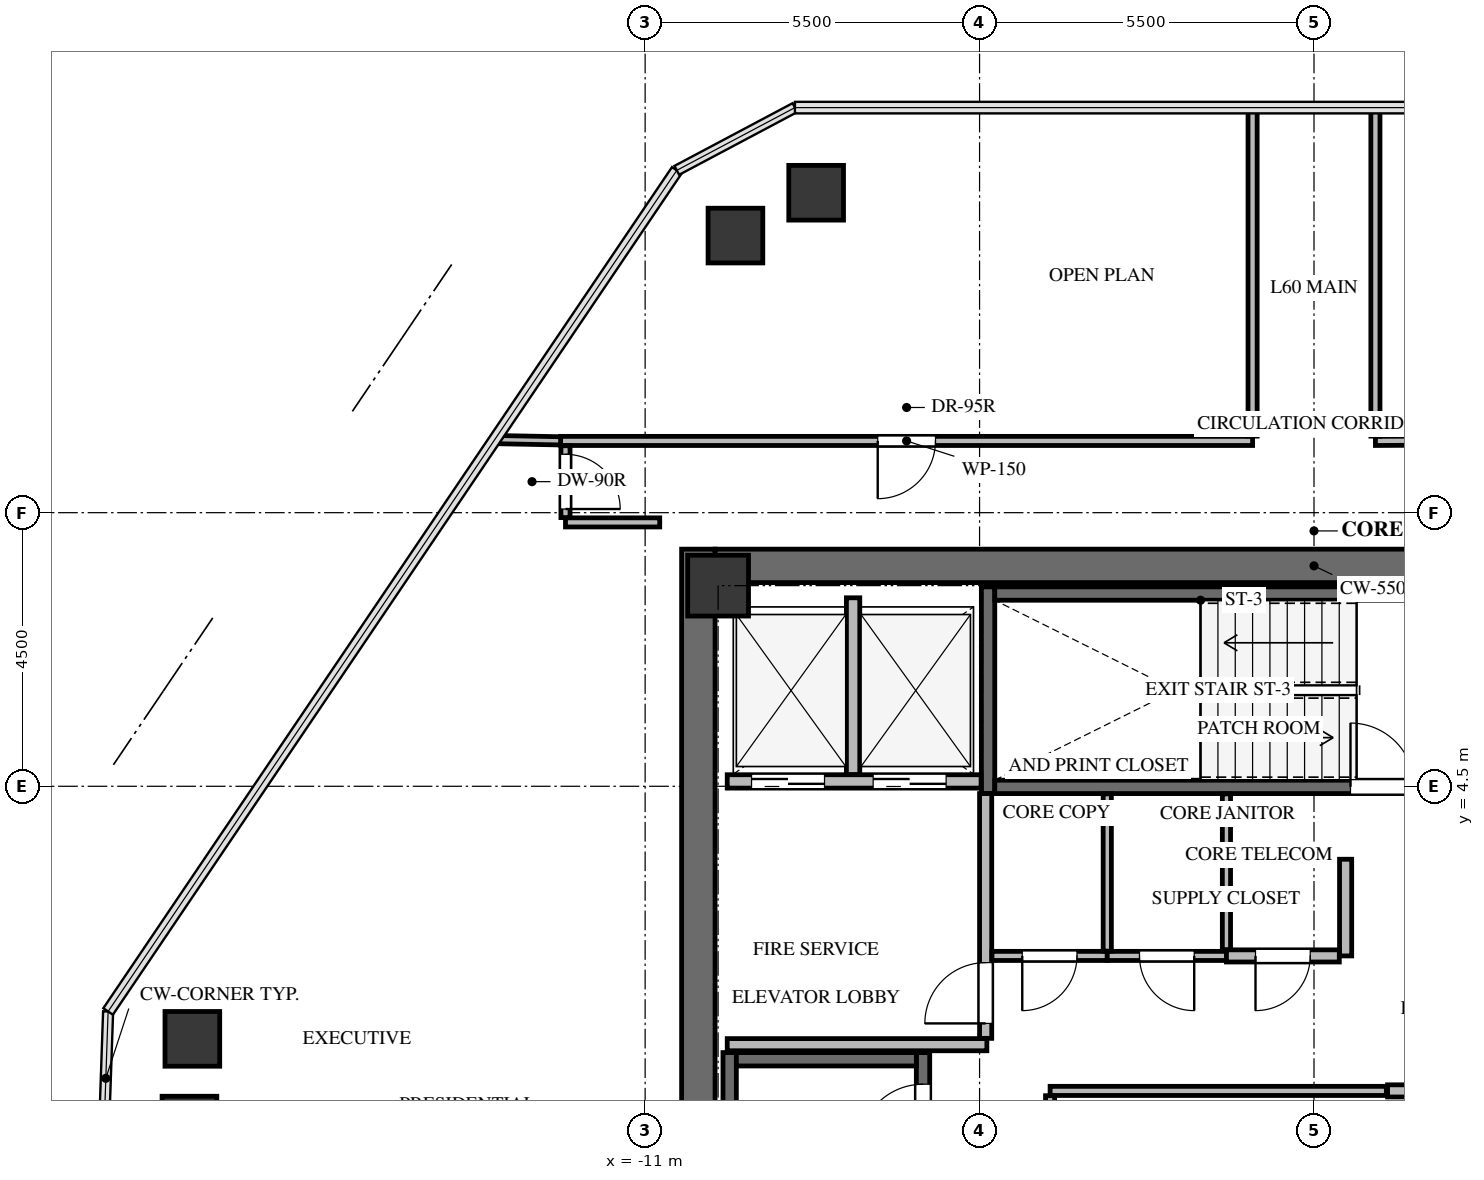
"""IFC4 building model, lengths in metres.
Left out: names, types, materials, properties, quantities, classifications, styles, units other than length and angle.
Written with IfcOpenShell. Run it as: python <this file> out.ifc"""

import sys

from ifc_helpers import new_model, si_unit, direction, frame, frame_2d, origin, origin_2d, place, context, subcontext, project, spatial, rectangle, extrude, source, transform, mapped, element, fill, save


model = new_model("IFC4")
c1 = context("Model", 3, precision=1e-05, world=origin(), true_north=direction((0.0, 1.0)))
c2 = subcontext(c1, "Body", "Model", "MODEL_VIEW")
j1 = project(units=[si_unit("LENGTHUNIT", "METRE"), si_unit("PLANEANGLEUNIT", "RADIAN")], contexts=[c1])
p1 = place(None, origin())
s1 = spatial("IfcSite", under=j1, at=p1, CompositionType="ELEMENT")
p2 = place(p1, origin())
s2 = spatial("IfcBuilding", under=s1, at=p2, CompositionType="ELEMENT")
p3 = place(p2, frame((0.0, 0.0, 218.3)))
s3 = spatial("IfcBuildingStorey", under=s2, at=p3, CompositionType="ELEMENT", Elevation=218.3)
p4 = place(p3, frame((-10.125, -8.4, 0.0), z_axis=(0.0, 0.0, 1.0), x_axis=(0.0, 1.0, 0.0)))
e1 = element("IfcWall", 1, at=p4, inside=s3, PredefinedType="SHEAR", context=c2, shape_type="SweptSolid", body=[
    extrude(rectangle(XDim=16.8, YDim=0.55, at=frame_2d((8.4, 0.0))), origin(), (0.0, 0.0, 1.0), 3.3),
])
p5 = place(p3, frame((-9.85, 8.125, 0.0), z_axis=(0.0, 0.0, 1.0), x_axis=(1.0, 0.0, 0.0)))
e2 = element("IfcWall", 2, at=p5, inside=s3, PredefinedType="SHEAR", context=c2, shape_type="SweptSolid", body=[
    extrude(rectangle(XDim=19.7, YDim=0.55, at=frame_2d((9.85, 0.0))), origin(), (0.0, 0.0, 1.0), 3.3),
])
p6 = place(p3, frame((-6.43, -7.77, -0.24), z_axis=(0.0, 0.0, 1.0), x_axis=(0.0, 1.0, 0.0)))
e3 = element("IfcWall", 3, at=p6, inside=s3, PredefinedType="SHEAR", context=c2, shape_type="SweptSolid", body=[
    extrude(rectangle(XDim=7.89, YDim=0.22, at=frame_2d((3.945, 0.0))), origin(), (0.0, 0.0, 1.0), 3.3),
])
p7 = place(p6, frame((6.32, 0.0, 0.0)))
e4 = element("IfcOpeningElement", 4, at=p7, cuts=e3, PredefinedType="OPENING", context=c2, shape_type="SweptSolid", body=[
    extrude(rectangle(XDim=1.05, YDim=2.15, at=frame_2d((0.525, 1.075))), frame((0.0, 0.12, 0.0), z_axis=(0.0, -1.0, 0.0), x_axis=(1.0, 0.0, 0.0)), (0.0, 0.0, 1.0), 0.24),
])
p8 = place(p3, frame((-9.61, 0.12, -0.24), z_axis=(0.0, 0.0, 1.0), x_axis=(0.0, -1.0, 0.0)))
e5 = element("IfcWall", 5, at=p8, inside=s3, PredefinedType="SHEAR", context=c2, shape_type="SweptSolid", body=[
    extrude(rectangle(XDim=7.89, YDim=0.22, at=frame_2d((3.945, 0.0))), origin(), (0.0, 0.0, 1.0), 3.3),
])
p9 = place(p3, frame((-6.54, 0.01, -0.24), z_axis=(0.0, 0.0, 1.0), x_axis=(-1.0, 0.0, 0.0)))
e6 = element("IfcWall", 6, at=p9, inside=s3, PredefinedType="SHEAR", context=c2, shape_type="SweptSolid", body=[
    extrude(rectangle(XDim=2.96, YDim=0.22, at=frame_2d((1.48, 0.0))), origin(), (0.0, 0.0, 1.0), 3.3),
])
p10 = place(p3, frame((-5.36, 7.78, -0.24), z_axis=(0.0, 0.0, 1.0), x_axis=(0.0, -1.0, 0.0)))
e7 = element("IfcWall", 7, at=p10, inside=s3, PredefinedType="SHEAR", context=c2, shape_type="SweptSolid", body=[
    extrude(rectangle(XDim=3.4, YDim=0.22, at=frame_2d((1.7, 0.0))), origin(), (0.0, 0.0, 1.0), 3.3),
])
p11 = place(p3, frame((-5.25, 4.49, -0.24), z_axis=(0.0, 0.0, 1.0), x_axis=(1.0, 0.0, 0.0)))
e8 = element("IfcWall", 8, at=p11, inside=s3, PredefinedType="SHEAR", context=c2, shape_type="SweptSolid", body=[
    extrude(rectangle(XDim=7.35, YDim=0.22, at=frame_2d((3.675, 0.0))), origin(), (0.0, 0.0, 1.0), 3.3),
])
p12 = place(p11, frame((5.85, 0.0, 0.0)))
e9 = element("IfcOpeningElement", 9, at=p12, cuts=e8, PredefinedType="OPENING", context=c2, shape_type="SweptSolid", body=[
    extrude(rectangle(XDim=1.05, YDim=2.15, at=frame_2d((0.525, 1.075))), frame((0.0, 0.12, 0.0), z_axis=(0.0, -1.0, 0.0), x_axis=(1.0, 0.0, 0.0)), (0.0, 0.0, 1.0), 0.24),
])
p13 = place(p3, frame((2.1, 7.67, -0.24), z_axis=(0.0, 0.0, 1.0), x_axis=(-1.0, 0.0, 0.0)))
e10 = element("IfcWall", 10, at=p13, inside=s3, PredefinedType="SHEAR", context=c2, shape_type="SweptSolid", body=[
    extrude(rectangle(XDim=7.35, YDim=0.22, at=frame_2d((3.675, 0.0))), origin(), (0.0, 0.0, 1.0), 3.3),
])
m1 = source(origin(), c2, "Body", "SweptSolid", [
    extrude(rectangle(XDim=1.0, YDim=1.0, at=origin_2d()), origin(), (0.0, 0.0, 1.0), 3.3),
])
p14 = place(p3, frame((-9.8, 7.8, -0.24), z_axis=(0.0, 0.0, 1.0), x_axis=(1.0, 0.0, 0.0)))
e11 = element("IfcColumn", 11, at=p14, inside=s3, PredefinedType="COLUMN", context=c2, shape_type="MappedRepresentation", body=[
    mapped(m1, transform((0.0, 0.0, 0.0), x_axis=(1.0, 0.0, 0.0), y_axis=(0.0, 1.0, 0.0), z_axis=(0.0, 0.0, 1.0), scale=1.0)),
])
m2 = source(origin(), c2, "Body", "SweptSolid", [
    extrude(rectangle(XDim=0.9, YDim=0.9, at=origin_2d()), origin(), (0.0, 0.0, 1.0), 3.3),
])
for number, where, z_axis, x_axis in (
    (12, (-18.494, -1.048, -0.24), (0.0, 0.0, 1.0), (1.0, 0.0, 0.0)),
    (13, (-18.446, 0.346, -0.24), (0.0, 0.0, 1.0), (1.0, 0.0, 0.0)),
    (14, (-9.515, 13.557, -0.24), (0.0, 0.0, 1.0), (1.0, 0.0, 0.0)),
    (15, (-8.188, 14.262, -0.24), (0.0, 0.0, 1.0), (1.0, 0.0, 0.0)),
):
    element("IfcColumn", number, at=place(p3, frame(where, z_axis=z_axis, x_axis=x_axis)), inside=s3, PredefinedType="COLUMN", context=c2, shape_type="MappedRepresentation", body=[
        mapped(m2, transform((0.0, 0.0, 0.0), x_axis=(1.0, 0.0, 0.0), y_axis=(0.0, 1.0, 0.0), z_axis=(0.0, 0.0, 1.0), scale=1.0)),
    ])
p15 = place(p3, frame((-9.65, 4.58, 0.0), z_axis=(0.0, 0.0, 1.0), x_axis=(1.0, 0.0, 0.0)))
e16 = element("IfcWall", 16, at=p15, inside=s3, PredefinedType="SOLIDWALL", context=c2, shape_type="SweptSolid", body=[
    extrude(rectangle(XDim=4.175, YDim=0.22, at=frame_2d((2.087, 0.0))), origin(), (0.0, 0.0, 1.0), 3.045),
])
p16 = place(p15, frame((0.4, 0.0, 0.0)))
e17 = element("IfcOpeningElement", 17, at=p16, cuts=e16, PredefinedType="OPENING", context=c2, shape_type="SweptSolid", body=[
    extrude(rectangle(XDim=1.2, YDim=2.15, at=frame_2d((0.6, 1.075))), frame((0.0, 0.12, 0.0), z_axis=(0.0, -1.0, 0.0), x_axis=(1.0, 0.0, 0.0)), (0.0, 0.0, 1.0), 0.24),
])
p17 = place(p15, frame((2.4, 0.0, 0.0)))
e18 = element("IfcOpeningElement", 18, at=p17, cuts=e16, PredefinedType="OPENING", context=c2, shape_type="SweptSolid", body=[
    extrude(rectangle(XDim=1.2, YDim=2.15, at=frame_2d((0.6, 1.075))), frame((0.0, 0.12, 0.0), z_axis=(0.0, -1.0, 0.0), x_axis=(1.0, 0.0, 0.0)), (0.0, 0.0, 1.0), 0.24),
])
p18 = place(p3, frame((-7.58, 4.694, 0.0), z_axis=(0.0, 0.0, 1.0), x_axis=(0.0, 1.0, 0.0)))
e19 = element("IfcWall", 19, at=p18, inside=s3, PredefinedType="SOLIDWALL", context=c2, shape_type="SweptSolid", body=[
    extrude(rectangle(XDim=2.906, YDim=0.22, at=frame_2d((1.453, 0.0))), origin(), (0.0, 0.0, 1.0), 3.045),
])
p19 = place(p3, frame((-9.65, 0.25, 0.0), z_axis=(0.0, 0.0, 1.0), x_axis=(1.0, 0.0, 0.0)))
e20 = element("IfcWall", 20, at=p19, inside=s3, PredefinedType="SOLIDWALL", context=c2, shape_type="SweptSolid", body=[
    extrude(rectangle(XDim=4.27, YDim=0.2, at=frame_2d((2.135, 0.0))), origin(), (0.0, 0.0, 1.0), 3.045),
])
p20 = place(p3, frame((-5.4, 0.354, 0.0), z_axis=(0.0, 0.0, 1.0), x_axis=(0.0, 1.0, 0.0)))
e21 = element("IfcWall", 21, at=p20, inside=s3, PredefinedType="SOLIDWALL", context=c2, shape_type="SweptSolid", body=[
    extrude(rectangle(XDim=4.026, YDim=0.2, at=frame_2d((2.013, 0.0))), origin(), (0.0, 0.0, 1.0), 3.045),
])
p21 = place(p20, frame((0.246, 0.0, 0.0)))
e22 = element("IfcOpeningElement", 22, at=p21, cuts=e21, PredefinedType="OPENING", context=c2, shape_type="SweptSolid", body=[
    extrude(rectangle(XDim=1.0, YDim=2.15, at=frame_2d((0.5, 1.075))), frame((0.0, 0.11, 0.0), z_axis=(0.0, -1.0, 0.0), x_axis=(1.0, 0.0, 0.0)), (0.0, 0.0, 1.0), 0.22),
])
p22 = place(p3, frame((-4.34, -0.51, 0.0), z_axis=(0.0, 0.0, 1.0), x_axis=(1.0, 0.0, 0.0)))
e23 = element("IfcWall", 23, at=p22, inside=s3, PredefinedType="PARTITIONING", context=c2, shape_type="SweptSolid", body=[
    extrude(rectangle(XDim=5.53, YDim=0.15, at=frame_2d((2.765, 0.0))), origin(), (0.0, 0.0, 1.0), 3.045),
])
p23 = place(p3, frame((-4.34, -2.961, 0.0), z_axis=(0.0, 0.0, 1.0), x_axis=(0.0, 1.0, 0.0)))
e24 = element("IfcWall", 24, at=p23, inside=s3, PredefinedType="PARTITIONING", context=c2, shape_type="SweptSolid", body=[
    extrude(rectangle(XDim=2.372, YDim=0.15, at=frame_2d((1.186, 0.0))), origin(), (0.0, 0.0, 1.0), 3.045),
])
p24 = place(p3, frame((1.21, -0.51, 0.0), z_axis=(0.0, 0.0, 1.0), x_axis=(1.0, 0.0, 0.0)))
e25 = element("IfcWall", 25, at=p24, inside=s3, PredefinedType="SOLIDWALL", context=c2, shape_type="SweptSolid", body=[
    extrude(rectangle(XDim=1.826, YDim=0.2, at=frame_2d((0.913, 0.0))), origin(), (0.0, 0.0, 1.0), 3.045),
])
p25 = place(p3, frame((-3.4, 1.71, 0.0), z_axis=(0.0, 0.0, 1.0), x_axis=(-1.0, 0.0, 0.0)))
e26 = element("IfcWall", 26, at=p25, inside=s3, PredefinedType="PARTITIONING", context=c2, shape_type="SweptSolid", body=[
    extrude(rectangle(XDim=1.896, YDim=0.15, at=frame_2d((0.948, 0.0))), origin(), (0.0, 0.0, 1.0), 3.045),
])
p26 = place(p25, frame((0.498, 0.0, 0.0)))
e27 = element("IfcOpeningElement", 27, at=p26, cuts=e26, PredefinedType="OPENING", context=c2, shape_type="SweptSolid", body=[
    extrude(rectangle(XDim=0.9, YDim=2.05, at=frame_2d((0.45, 1.025))), frame((0.0, 0.085, 0.0), z_axis=(0.0, -1.0, 0.0), x_axis=(1.0, 0.0, 0.0)), (0.0, 0.0, 1.0), 0.17),
])
p27 = place(p3, frame((-1.44, 1.71, 0.0), z_axis=(0.0, 0.0, 1.0), x_axis=(-1.0, 0.0, 0.0)))
e28 = element("IfcWall", 28, at=p27, inside=s3, PredefinedType="PARTITIONING", context=c2, shape_type="SweptSolid", body=[
    extrude(rectangle(XDim=1.96, YDim=0.15, at=frame_2d((0.98, 0.0))), origin(), (0.0, 0.0, 1.0), 3.045),
])
p28 = place(p27, frame((0.53, 0.0, 0.0)))
e29 = element("IfcOpeningElement", 29, at=p28, cuts=e28, PredefinedType="OPENING", context=c2, shape_type="SweptSolid", body=[
    extrude(rectangle(XDim=0.9, YDim=2.05, at=frame_2d((0.45, 1.025))), frame((0.0, 0.085, 0.0), z_axis=(0.0, -1.0, 0.0), x_axis=(1.0, 0.0, 0.0)), (0.0, 0.0, 1.0), 0.17),
])
p29 = place(p3, frame((0.52, 3.3, 0.0), z_axis=(0.0, 0.0, 1.0), x_axis=(0.0, -1.0, 0.0)))
e30 = element("IfcWall", 30, at=p29, inside=s3, PredefinedType="SOLIDWALL", context=c2, shape_type="SweptSolid", body=[
    extrude(rectangle(XDim=1.59, YDim=0.2, at=frame_2d((0.795, 0.0))), origin(), (0.0, 0.0, 1.0), 3.045),
])
p30 = place(p3, frame((0.416, 1.71, 0.0), z_axis=(0.0, 0.0, 1.0), x_axis=(-1.0, 0.0, 0.0)))
e31 = element("IfcWall", 31, at=p30, inside=s3, PredefinedType="SOLIDWALL", context=c2, shape_type="SweptSolid", body=[
    extrude(rectangle(XDim=1.856, YDim=0.2, at=frame_2d((0.928, 0.0))), origin(), (0.0, 0.0, 1.0), 3.045),
])
p31 = place(p30, frame((0.478, 0.0, 0.0)))
e32 = element("IfcOpeningElement", 32, at=p31, cuts=e31, PredefinedType="OPENING", context=c2, shape_type="SweptSolid", body=[
    extrude(rectangle(XDim=0.9, YDim=2.05, at=frame_2d((0.45, 1.025))), frame((0.0, 0.11, 0.0), z_axis=(0.0, -1.0, 0.0), x_axis=(1.0, 0.0, 0.0)), (0.0, 0.0, 1.0), 0.22),
])
p32 = place(p3, frame((-1.01, 10.18, 0.0), z_axis=(0.0, 0.0, 1.0), x_axis=(-1.0, 0.0, 0.0)))
e33 = element("IfcWall", 33, at=p32, inside=s3, PredefinedType="PARTITIONING", context=c2, shape_type="SweptSolid", body=[
    extrude(rectangle(XDim=11.38, YDim=0.15, at=frame_2d((5.69, 0.0))), origin(), (0.0, 0.0, 1.0), 2.301),
])
p33 = place(p32, frame((5.215, 0.0, 0.0)))
e34 = element("IfcOpeningElement", 34, at=p33, cuts=e33, PredefinedType="OPENING", context=c2, shape_type="SweptSolid", body=[
    extrude(rectangle(XDim=0.95, YDim=2.1, at=frame_2d((0.475, 1.05))), frame((0.0, 0.085, 0.0), z_axis=(0.0, -1.0, 0.0), x_axis=(1.0, 0.0, 0.0)), (0.0, 0.0, 1.0), 0.17),
])
p34 = place(p3, frame((-1.01, 15.662, 0.0), z_axis=(0.0, 0.0, 1.0), x_axis=(0.0, -1.0, 0.0)))
e35 = element("IfcWall", 35, at=p34, inside=s3, PredefinedType="PARTITIONING", context=c2, shape_type="SweptSolid", body=[
    extrude(rectangle(XDim=5.403, YDim=0.15, at=frame_2d((2.702, 0.0))), origin(), (0.0, 0.0, 1.0), 2.399),
])
p35 = place(p3, frame((12.368, 10.243, 0.0), z_axis=(0.0, 0.0, 1.0), x_axis=(-0.999984623931, -0.005545439622, 0.0)))
e36 = element("IfcWall", 36, at=p35, inside=s3, PredefinedType="PARTITIONING", context=c2, shape_type="SweptSolid", body=[
    extrude(rectangle(XDim=11.359, YDim=0.15, at=frame_2d((5.679, 0.0))), origin(), (0.0, 0.0, 1.0), 2.301),
])
p36 = place(p35, frame((5.219, 0.0, 0.0)))
e37 = element("IfcOpeningElement", 37, at=p36, cuts=e36, PredefinedType="OPENING", context=c2, shape_type="SweptSolid", body=[
    extrude(rectangle(XDim=0.92, YDim=2.1, at=frame_2d((0.46, 1.05))), frame((0.0, 0.085, 0.0), z_axis=(0.0, -1.0, 0.0), x_axis=(1.0, 0.0, 0.0)), (0.0, 0.0, 1.0), 0.17),
])
p37 = place(p3, frame((1.01, 10.259, 0.0), z_axis=(0.0, 0.0, 1.0), x_axis=(0.0, 1.0, 0.0)))
e38 = element("IfcWall", 38, at=p37, inside=s3, PredefinedType="PARTITIONING", context=c2, shape_type="SweptSolid", body=[
    extrude(rectangle(XDim=5.403, YDim=0.15, at=frame_2d((2.702, 0.0))), origin(), (0.0, 0.0, 1.0), 2.399),
])
p38 = place(p3, frame((-12.31, 8.84, 0.0), z_axis=(0.0, 0.0, 1.0), x_axis=(1.0, 0.0, 0.0)))
e39 = element("IfcWall", 39, at=p38, inside=s3, PredefinedType="PARTITIONING", context=c2, shape_type="SweptSolid", body=[
    extrude(rectangle(XDim=1.55, YDim=0.15, at=frame_2d((0.775, 0.0))), origin(), (0.0, 0.0, 1.0), 3.045),
])
p39 = place(p3, frame((-12.31, 10.101, 0.0), z_axis=(0.0, 0.0, 1.0), x_axis=(0.0, -1.0, 0.0)))
e40 = element("IfcWall", 40, at=p39, inside=s3, PredefinedType="PARTITIONING", context=c2, shape_type="SweptSolid", body=[
    extrude(rectangle(XDim=1.182, YDim=0.15, at=frame_2d((0.591, 0.0))), origin(), (0.0, 0.0, 1.0), 2.399),
])
p40 = place(p39, frame((0.141, 0.0, 0.0)))
e41 = element("IfcOpeningElement", 41, at=p40, cuts=e40, PredefinedType="OPENING", context=c2, shape_type="SweptSolid", body=[
    extrude(rectangle(XDim=0.9, YDim=2.05, at=frame_2d((0.45, 1.025))), frame((0.0, 0.085, 0.0), z_axis=(0.0, -1.0, 0.0), x_axis=(1.0, 0.0, 0.0)), (0.0, 0.0, 1.0), 0.17),
])
p41 = place(p3, frame((-3.4, 4.375, 0.0), z_axis=(0.0, 0.0, 1.0), x_axis=(0.0, -1.0, 0.0)))
e42 = element("IfcWall", 42, at=p41, inside=s3, PredefinedType="PARTITIONING", context=c2, shape_type="SweptSolid", body=[
    extrude(rectangle(XDim=2.586, YDim=0.135, at=frame_2d((1.293, 0.0))), origin(), (0.0, 0.0, 1.0), 3.045),
])
p42 = place(p3, frame((-1.44, 4.375, 0.0), z_axis=(0.0, 0.0, 1.0), x_axis=(0.0, -1.0, 0.0)))
e43 = element("IfcWall", 43, at=p42, inside=s3, PredefinedType="PARTITIONING", context=c2, shape_type="SweptSolid", body=[
    extrude(rectangle(XDim=2.561, YDim=0.135, at=frame_2d((1.281, 0.0))), origin(), (0.0, 0.0, 1.0), 3.045),
])
p43 = place(p3, frame((-12.39, 10.181, 0.0), z_axis=(0.0, 0.0, 1.0), x_axis=(-0.999812128272, 0.019383192748, 0.0)))
e44 = element("IfcWall", 44, at=p43, inside=s3, PredefinedType="PARTITIONING", context=c2, shape_type="SweptSolid", body=[
    extrude(rectangle(XDim=1.083, YDim=0.135, at=frame_2d((0.542, 0.0))), origin(), (0.0, 0.0, 1.0), 3.045),
])
m3 = source(origin(), c2, "Body", "SweptSolid", [
    extrude(rectangle(XDim=1.05, YDim=2.15, at=frame_2d((0.525, 1.075))), frame((0.0, 0.025, 0.0), z_axis=(0.0, -1.0, 0.0), x_axis=(1.0, 0.0, 0.0)), (0.0, 0.0, 1.0), 0.05),
])
p44 = place(p7, origin())
e45 = element("IfcDoor", 45, at=p44, inside=s3, OperationType="SINGLE_SWING_LEFT", PredefinedType="DOOR", context=c2, shape_type="MappedRepresentation", body=[
    mapped(m3, transform((0.0, 0.0, 0.0), x_axis=(1.0, 0.0, 0.0), y_axis=(0.0, 1.0, 0.0), z_axis=(0.0, 0.0, 1.0), scale=1.0)),
])
fill(e4, e45)
p45 = place(p12, origin())
e46 = element("IfcDoor", 46, at=p45, inside=s3, OperationType="SINGLE_SWING_LEFT", PredefinedType="DOOR", context=c2, shape_type="MappedRepresentation", body=[
    mapped(m3, transform((0.0, 0.0, 0.0), x_axis=(1.0, 0.0, 0.0), y_axis=(0.0, 1.0, 0.0), z_axis=(0.0, 0.0, 1.0), scale=1.0)),
])
fill(e9, e46)
m4 = source(origin(), c2, "Body", "SweptSolid", [
    extrude(rectangle(XDim=1.2, YDim=2.15, at=frame_2d((0.6, 1.075))), frame((0.0, 0.025, 0.0), z_axis=(0.0, -1.0, 0.0), x_axis=(1.0, 0.0, 0.0)), (0.0, 0.0, 1.0), 0.05),
])
p46 = place(p16, origin())
e47 = element("IfcDoor", 47, at=p46, inside=s3, OperationType="DOUBLE_DOOR_SLIDING", PredefinedType="DOOR", context=c2, shape_type="MappedRepresentation", body=[
    mapped(m4, transform((0.0, 0.0, 0.0), x_axis=(1.0, 0.0, 0.0), y_axis=(0.0, 1.0, 0.0), z_axis=(0.0, 0.0, 1.0), scale=1.0)),
])
fill(e17, e47)
p47 = place(p17, origin())
e48 = element("IfcDoor", 48, at=p47, inside=s3, OperationType="DOUBLE_DOOR_SLIDING", PredefinedType="DOOR", context=c2, shape_type="MappedRepresentation", body=[
    mapped(m4, transform((0.0, 0.0, 0.0), x_axis=(1.0, 0.0, 0.0), y_axis=(0.0, 1.0, 0.0), z_axis=(0.0, 0.0, 1.0), scale=1.0)),
])
fill(e18, e48)
m5 = source(origin(), c2, "Body", "SweptSolid", [
    extrude(rectangle(XDim=1.0, YDim=2.15, at=frame_2d((0.5, 1.075))), frame((0.0, 0.025, 0.0), z_axis=(0.0, -1.0, 0.0), x_axis=(1.0, 0.0, 0.0)), (0.0, 0.0, 1.0), 0.05),
])
p48 = place(p21, origin())
e49 = element("IfcDoor", 49, at=p48, inside=s3, OperationType="SINGLE_SWING_LEFT", PredefinedType="DOOR", context=c2, shape_type="MappedRepresentation", body=[
    mapped(m5, transform((0.0, 0.0, 0.0), x_axis=(1.0, 0.0, 0.0), y_axis=(0.0, 1.0, 0.0), z_axis=(0.0, 0.0, 1.0), scale=1.0)),
])
fill(e22, e49)
m6 = source(origin(), c2, "Body", "SweptSolid", [
    extrude(rectangle(XDim=0.9, YDim=2.05, at=frame_2d((0.45, 1.025))), frame((0.0, 0.025, 0.0), z_axis=(0.0, -1.0, 0.0), x_axis=(1.0, 0.0, 0.0)), (0.0, 0.0, 1.0), 0.05),
])
p49 = place(p26, origin())
e50 = element("IfcDoor", 50, at=p49, inside=s3, OperationType="SINGLE_SWING_RIGHT", PredefinedType="DOOR", context=c2, shape_type="MappedRepresentation", body=[
    mapped(m6, transform((0.0, 0.0, 0.0), x_axis=(1.0, 0.0, 0.0), y_axis=(0.0, 1.0, 0.0), z_axis=(0.0, 0.0, 1.0), scale=1.0)),
])
fill(e27, e50)
m7 = source(origin(), c2, "Body", "SweptSolid", [
    extrude(rectangle(XDim=0.9, YDim=2.05, at=frame_2d((0.45, 1.025))), frame((0.0, 0.025, 0.0), z_axis=(0.0, -1.0, 0.0), x_axis=(1.0, 0.0, 0.0)), (0.0, 0.0, 1.0), 0.05),
])
p50 = place(p28, origin())
e51 = element("IfcDoor", 51, at=p50, inside=s3, OperationType="SINGLE_SWING_LEFT", PredefinedType="DOOR", context=c2, shape_type="MappedRepresentation", body=[
    mapped(m7, transform((0.0, 0.0, 0.0), x_axis=(1.0, 0.0, 0.0), y_axis=(0.0, 1.0, 0.0), z_axis=(0.0, 0.0, 1.0), scale=1.0)),
])
fill(e29, e51)
p51 = place(p31, origin())
e52 = element("IfcDoor", 52, at=p51, inside=s3, OperationType="SINGLE_SWING_RIGHT", PredefinedType="DOOR", context=c2, shape_type="MappedRepresentation", body=[
    mapped(m6, transform((0.0, 0.0, 0.0), x_axis=(1.0, 0.0, 0.0), y_axis=(0.0, 1.0, 0.0), z_axis=(0.0, 0.0, 1.0), scale=1.0)),
])
fill(e32, e52)
m8 = source(origin(), c2, "Body", "SweptSolid", [
    extrude(rectangle(XDim=0.95, YDim=2.1, at=frame_2d((0.475, 1.05))), frame((0.0, 0.025, 0.0), z_axis=(0.0, -1.0, 0.0), x_axis=(1.0, 0.0, 0.0)), (0.0, 0.0, 1.0), 0.05),
])
p52 = place(p33, origin())
e53 = element("IfcDoor", 53, at=p52, inside=s3, OperationType="SINGLE_SWING_RIGHT", PredefinedType="DOOR", context=c2, shape_type="MappedRepresentation", body=[
    mapped(m8, transform((0.0, 0.0, 0.0), x_axis=(1.0, 0.0, 0.0), y_axis=(0.0, 1.0, 0.0), z_axis=(0.0, 0.0, 1.0), scale=1.0)),
])
fill(e34, e53)
m9 = source(origin(), c2, "Body", "SweptSolid", [
    extrude(rectangle(XDim=0.9, YDim=2.05, at=frame_2d((0.45, 1.025))), frame((0.0, 0.025, 0.0), z_axis=(0.0, -1.0, 0.0), x_axis=(1.0, 0.0, 0.0)), (0.0, 0.0, 1.0), 0.05),
])
p53 = place(p40, origin())
e54 = element("IfcDoor", 54, at=p53, inside=s3, OperationType="SINGLE_SWING_RIGHT", PredefinedType="DOOR", context=c2, shape_type="MappedRepresentation", body=[
    mapped(m9, transform((0.0, 0.0, 0.0), x_axis=(1.0, 0.0, 0.0), y_axis=(0.0, 1.0, 0.0), z_axis=(0.0, 0.0, 1.0), scale=1.0)),
])
fill(e41, e54)
save(model, sys.argv[1])
